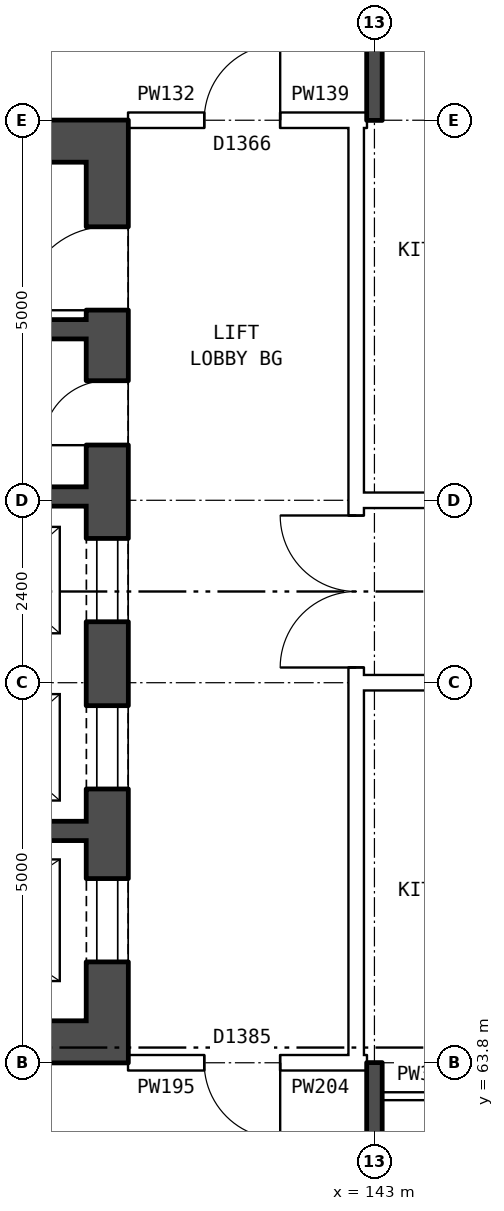
"""IFC4 building model, lengths in metres.
Left out: names, types, materials, properties, quantities, classifications, styles, units other than length and angle.
Written with IfcOpenShell. Run it as: python <this file> out.ifc"""

import sys

from ifc_helpers import new_model, si_unit, direction, frame, frame_2d, origin, place, context, subcontext, project, spatial, rectangle, extrude, element, fill, save


model = new_model("IFC4")
c1 = context("Model", 3, precision=1e-05, world=origin(), true_north=direction((0.0, 1.0)))
c2 = subcontext(c1, "Body", "Model", "MODEL_VIEW")
j1 = project(units=[si_unit("LENGTHUNIT", "METRE"), si_unit("PLANEANGLEUNIT", "RADIAN")], contexts=[c1])
p1 = place(None, origin())
s1 = spatial("IfcSite", under=j1, at=p1, CompositionType="ELEMENT")
p2 = place(p1, origin())
s2 = spatial("IfcBuilding", under=s1, at=p2, CompositionType="ELEMENT")
p3 = place(p2, frame((0.0, 0.0, 129.9)))
s3 = spatial("IfcBuildingStorey", under=s2, at=p3, CompositionType="ELEMENT", Elevation=129.9)
p4 = place(p3, frame((139.485, 63.8, 0.0), z_axis=(0.0, 0.0, 1.0), x_axis=(0.0, 1.0, 0.0)))
e1 = element("IfcWall", 1, at=p4, inside=s3, PredefinedType="SHEAR", context=c2, shape_type="SweptSolid", body=[
    extrude(rectangle(XDim=12.4, YDim=0.55, at=frame_2d((6.2, 0.0))), origin(), (0.0, 0.0, 1.0), 2.85),
])
p5 = place(p4, frame((1.325, 0.0, 0.0)))
e2 = element("IfcOpeningElement", 2, at=p5, cuts=e1, PredefinedType="OPENING", context=c2, shape_type="SweptSolid", body=[
    extrude(rectangle(XDim=1.1, YDim=2.1, at=frame_2d((0.55, 1.05))), frame((0.0, 0.285, 0.0), z_axis=(0.0, -1.0, 0.0), x_axis=(1.0, 0.0, 0.0)), (0.0, 0.0, 1.0), 0.57),
])
p6 = place(p4, frame((3.6, 0.0, 0.0)))
e3 = element("IfcOpeningElement", 3, at=p6, cuts=e1, PredefinedType="OPENING", context=c2, shape_type="SweptSolid", body=[
    extrude(rectangle(XDim=1.1, YDim=2.1, at=frame_2d((0.55, 1.05))), frame((0.0, 0.285, 0.0), z_axis=(0.0, -1.0, 0.0), x_axis=(1.0, 0.0, 0.0)), (0.0, 0.0, 1.0), 0.57),
])
p7 = place(p4, frame((5.8, 0.0, 0.0)))
e4 = element("IfcOpeningElement", 4, at=p7, cuts=e1, PredefinedType="OPENING", context=c2, shape_type="SweptSolid", body=[
    extrude(rectangle(XDim=1.1, YDim=2.1, at=frame_2d((0.55, 1.05))), frame((0.0, 0.285, 0.0), z_axis=(0.0, -1.0, 0.0), x_axis=(1.0, 0.0, 0.0)), (0.0, 0.0, 1.0), 0.57),
])
p8 = place(p4, frame((9.9, 0.0, 0.0)))
e5 = element("IfcOpeningElement", 5, at=p8, cuts=e1, PredefinedType="OPENING", context=c2, shape_type="SweptSolid", body=[
    extrude(rectangle(XDim=1.1, YDim=2.1, at=frame_2d((0.55, 1.05))), frame((0.0, 0.285, 0.0), z_axis=(0.0, -1.0, 0.0), x_axis=(1.0, 0.0, 0.0)), (0.0, 0.0, 1.0), 0.57),
])
p9 = place(p4, frame((8.125, 0.0, 0.0)))
e6 = element("IfcOpeningElement", 6, at=p9, cuts=e1, PredefinedType="OPENING", context=c2, shape_type="SweptSolid", body=[
    extrude(rectangle(XDim=0.85, YDim=2.1, at=frame_2d((0.425, 1.05))), frame((0.0, 0.285, 0.0), z_axis=(0.0, -1.0, 0.0), x_axis=(1.0, 0.0, 0.0)), (0.0, 0.0, 1.0), 0.57),
])
for number, where, z_axis, x_axis in (
    (7, (139.21, 64.075, 0.0), (0.0, 0.0, 1.0), (-1.0, 0.0, 0.0)),
    (8, (139.21, 75.925, 0.0), (0.0, 0.0, 1.0), (-1.0, 0.0, 0.0)),
):
    element("IfcWall", number, at=place(p3, frame(where, z_axis=z_axis, x_axis=x_axis)), inside=s3, PredefinedType="SHEAR", context=c2, shape_type="SweptSolid", body=[
        extrude(rectangle(XDim=7.3, YDim=0.55, at=frame_2d((3.65, 0.0))), origin(), (0.0, 0.0, 1.0), 2.85),
    ])
p10 = place(p3, frame((139.21, 66.85, 0.0), z_axis=(0.0, 0.0, 1.0), x_axis=(-1.0, 0.0, 0.0)))
e9 = element("IfcWall", 9, at=p10, inside=s3, PredefinedType="SHEAR", context=c2, shape_type="SweptSolid", body=[
    extrude(rectangle(XDim=4.475, YDim=0.25, at=frame_2d((2.237, 0.0))), origin(), (0.0, 0.0, 1.0), 2.85),
])
p11 = place(p3, frame((139.21, 71.25, 0.0), z_axis=(0.0, 0.0, 1.0), x_axis=(-1.0, 0.0, 0.0)))
e10 = element("IfcWall", 10, at=p11, inside=s3, PredefinedType="SHEAR", context=c2, shape_type="SweptSolid", body=[
    extrude(rectangle(XDim=7.3, YDim=0.25, at=frame_2d((3.65, 0.0))), origin(), (0.0, 0.0, 1.0), 2.85),
])
p12 = place(p11, frame((4.875, 0.0, 0.0)))
e11 = element("IfcOpeningElement", 11, at=p12, cuts=e10, PredefinedType="OPENING", context=c2, shape_type="SweptSolid", body=[
    extrude(rectangle(XDim=1.1, YDim=2.1, at=frame_2d((0.55, 1.05))), frame((0.0, 0.135, 0.0), z_axis=(0.0, -1.0, 0.0), x_axis=(1.0, 0.0, 0.0)), (0.0, 0.0, 1.0), 0.27),
])
p13 = place(p11, frame((3.125, 0.0, 0.0)))
e12 = element("IfcOpeningElement", 12, at=p13, cuts=e10, PredefinedType="OPENING", context=c2, shape_type="SweptSolid", body=[
    extrude(rectangle(XDim=0.85, YDim=2.1, at=frame_2d((0.425, 1.05))), frame((0.0, 0.135, 0.0), z_axis=(0.0, -1.0, 0.0), x_axis=(1.0, 0.0, 0.0)), (0.0, 0.0, 1.0), 0.27),
])
p14 = place(p3, frame((139.21, 73.45, 0.0), z_axis=(0.0, 0.0, 1.0), x_axis=(-1.0, 0.0, 0.0)))
e13 = element("IfcWall", 13, at=p14, inside=s3, PredefinedType="SHEAR", context=c2, shape_type="SweptSolid", body=[
    extrude(rectangle(XDim=2.375, YDim=0.25, at=frame_2d((1.188, 0.0))), origin(), (0.0, 0.0, 1.0), 2.85),
])
p15 = place(p3, frame((142.76, 63.9, 0.0), z_axis=(0.0, 0.0, 1.0), x_axis=(0.0, 1.0, 0.0)))
e14 = element("IfcWall", 14, at=p15, inside=s3, PredefinedType="PARTITIONING", context=c2, shape_type="SweptSolid", body=[
    extrude(rectangle(XDim=12.2, YDim=0.2, at=frame_2d((6.1, 0.0))), origin(), (0.0, 0.0, 1.0), 2.85),
])
p16 = place(p15, frame((5.1, 0.0, 0.0)))
e15 = element("IfcOpeningElement", 15, at=p16, cuts=e14, PredefinedType="OPENING", context=c2, shape_type="SweptSolid", body=[
    extrude(rectangle(XDim=2.0, YDim=2.1, at=frame_2d((1.0, 1.05))), frame((0.0, 0.11, 0.0), z_axis=(0.0, -1.0, 0.0), x_axis=(1.0, 0.0, 0.0)), (0.0, 0.0, 1.0), 0.22),
])
p17 = place(p3, frame((143.1, 63.36, 0.0), z_axis=(0.0, 0.0, 1.0), x_axis=(1.0, 0.0, 0.0)))
e16 = element("IfcWall", 16, at=p17, inside=s3, PredefinedType="PARTITIONING", context=c2, shape_type="SweptSolid", body=[
    extrude(rectangle(XDim=2.9, YDim=0.1, at=frame_2d((1.45, 0.0))), origin(), (0.0, 0.0, 1.0), 2.85),
])
p18 = place(p17, frame((1.0, 0.0, 0.0)))
e17 = element("IfcOpeningElement", 17, at=p18, cuts=e16, PredefinedType="OPENING", context=c2, shape_type="SweptSolid", body=[
    extrude(rectangle(XDim=0.9, YDim=2.1, at=frame_2d((0.45, 1.05))), frame((0.0, 0.06, 0.0), z_axis=(0.0, -1.0, 0.0), x_axis=(1.0, 0.0, 0.0)), (0.0, 0.0, 1.0), 0.12),
])
p19 = place(p3, frame((139.76, 63.8, 0.0), z_axis=(0.0, 0.0, 1.0), x_axis=(1.0, 0.0, 0.0)))
e18 = element("IfcWall", 18, at=p19, inside=s3, PredefinedType="PARTITIONING", context=c2, shape_type="SweptSolid", body=[
    extrude(rectangle(XDim=3.0, YDim=0.2, at=frame_2d((1.5, 0.0))), origin(), (0.0, 0.0, 1.0), 2.85),
])
p20 = place(p19, frame((1.0, 0.0, 0.0)))
e19 = element("IfcOpeningElement", 19, at=p20, cuts=e18, PredefinedType="OPENING", context=c2, shape_type="SweptSolid", body=[
    extrude(rectangle(XDim=1.0, YDim=2.1, at=frame_2d((0.5, 1.05))), frame((0.0, 0.11, 0.0), z_axis=(0.0, -1.0, 0.0), x_axis=(1.0, 0.0, 0.0)), (0.0, 0.0, 1.0), 0.22),
])
p21 = place(p3, frame((142.76, 63.8, 0.0), z_axis=(0.0, 0.0, 1.0), x_axis=(1.0, 0.0, 0.0)))
e20 = element("IfcWall", 20, at=p21, inside=s3, PredefinedType="PARTITIONING", context=c2, shape_type="SweptSolid", body=[
    extrude(rectangle(XDim=0.14, YDim=0.2, at=frame_2d((0.07, 0.0))), origin(), (0.0, 0.0, 1.0), 2.85),
])
p22 = place(p3, frame((142.76, 68.8, 0.0), z_axis=(0.0, 0.0, 1.0), x_axis=(1.0, 0.0, 0.0)))
e21 = element("IfcWall", 21, at=p22, inside=s3, PredefinedType="PARTITIONING", context=c2, shape_type="SweptSolid", body=[
    extrude(rectangle(XDim=14.48, YDim=0.2, at=frame_2d((7.24, 0.0))), origin(), (0.0, 0.0, 1.0), 2.85),
])
p23 = place(p22, frame((1.12, 0.0, 0.0)))
e22 = element("IfcOpeningElement", 22, at=p23, cuts=e21, PredefinedType="OPENING", context=c2, shape_type="SweptSolid", body=[
    extrude(rectangle(XDim=1.0, YDim=2.1, at=frame_2d((0.5, 1.05))), frame((0.0, 0.11, 0.0), z_axis=(0.0, -1.0, 0.0), x_axis=(1.0, 0.0, 0.0)), (0.0, 0.0, 1.0), 0.22),
])
p24 = place(p22, frame((7.24, 0.0, 0.0)))
e23 = element("IfcOpeningElement", 23, at=p24, cuts=e21, PredefinedType="OPENING", context=c2, shape_type="SweptSolid", body=[
    extrude(rectangle(XDim=1.0, YDim=2.1, at=frame_2d((0.5, 1.05))), frame((0.0, 0.11, 0.0), z_axis=(0.0, -1.0, 0.0), x_axis=(1.0, 0.0, 0.0)), (0.0, 0.0, 1.0), 0.22),
])
p25 = place(p3, frame((142.76, 71.2, 0.0), z_axis=(0.0, 0.0, 1.0), x_axis=(1.0, 0.0, 0.0)))
e24 = element("IfcWall", 24, at=p25, inside=s3, PredefinedType="PARTITIONING", context=c2, shape_type="SweptSolid", body=[
    extrude(rectangle(XDim=14.48, YDim=0.2, at=frame_2d((7.24, 0.0))), origin(), (0.0, 0.0, 1.0), 2.85),
])
p26 = place(p25, frame((1.12, 0.0, 0.0)))
e25 = element("IfcOpeningElement", 25, at=p26, cuts=e24, PredefinedType="OPENING", context=c2, shape_type="SweptSolid", body=[
    extrude(rectangle(XDim=1.0, YDim=2.1, at=frame_2d((0.5, 1.05))), frame((0.0, 0.11, 0.0), z_axis=(0.0, -1.0, 0.0), x_axis=(1.0, 0.0, 0.0)), (0.0, 0.0, 1.0), 0.22),
])
p27 = place(p25, frame((10.24, 0.0, 0.0)))
e26 = element("IfcOpeningElement", 26, at=p27, cuts=e24, PredefinedType="OPENING", context=c2, shape_type="SweptSolid", body=[
    extrude(rectangle(XDim=1.0, YDim=2.1, at=frame_2d((0.5, 1.05))), frame((0.0, 0.11, 0.0), z_axis=(0.0, -1.0, 0.0), x_axis=(1.0, 0.0, 0.0)), (0.0, 0.0, 1.0), 0.22),
])
p28 = place(p3, frame((139.76, 76.2, 0.0), z_axis=(0.0, 0.0, 1.0), x_axis=(1.0, 0.0, 0.0)))
e27 = element("IfcWall", 27, at=p28, inside=s3, PredefinedType="PARTITIONING", context=c2, shape_type="SweptSolid", body=[
    extrude(rectangle(XDim=3.0, YDim=0.2, at=frame_2d((1.5, 0.0))), origin(), (0.0, 0.0, 1.0), 2.85),
])
p29 = place(p28, frame((1.0, 0.0, 0.0)))
e28 = element("IfcOpeningElement", 28, at=p29, cuts=e27, PredefinedType="OPENING", context=c2, shape_type="SweptSolid", body=[
    extrude(rectangle(XDim=1.0, YDim=2.1, at=frame_2d((0.5, 1.05))), frame((0.0, 0.11, 0.0), z_axis=(0.0, -1.0, 0.0), x_axis=(1.0, 0.0, 0.0)), (0.0, 0.0, 1.0), 0.22),
])
p30 = place(p3, frame((142.76, 76.2, 0.0), z_axis=(0.0, 0.0, 1.0), x_axis=(1.0, 0.0, 0.0)))
e29 = element("IfcWall", 29, at=p30, inside=s3, PredefinedType="PARTITIONING", context=c2, shape_type="SweptSolid", body=[
    extrude(rectangle(XDim=0.14, YDim=0.2, at=frame_2d((0.07, 0.0))), origin(), (0.0, 0.0, 1.0), 2.85),
])
for number, where, z_axis, x_axis in (
    (30, (143.0, 54.36, 0.0), (0.0, 0.0, 1.0), (0.0, 1.0, 0.0)),
    (31, (143.0, 76.2, 0.0), (0.0, 0.0, 1.0), (0.0, 1.0, 0.0)),
):
    element("IfcWall", number, at=place(p3, frame(where, z_axis=z_axis, x_axis=x_axis)), inside=s3, PredefinedType="SOLIDWALL", context=c2, shape_type="SweptSolid", body=[
        extrude(rectangle(XDim=9.44, YDim=0.2, at=frame_2d((4.72, 0.0))), origin(), (0.0, 0.0, 1.0), 2.85),
    ])
p31 = place(p5, origin())
e32 = element("IfcDoor", 32, at=p31, inside=s3, OperationType="DOUBLE_DOOR_SLIDING", PredefinedType="DOOR", context=c2, shape_type="SweptSolid", body=[
    extrude(rectangle(XDim=1.1, YDim=2.1, at=frame_2d((0.55, 1.05))), frame((0.0, 0.26, 0.0), z_axis=(0.0, -1.0, 0.0), x_axis=(1.0, 0.0, 0.0)), (0.0, 0.0, 1.0), 0.05),
])
fill(e2, e32)
p32 = place(p6, origin())
e33 = element("IfcDoor", 33, at=p32, inside=s3, OperationType="DOUBLE_DOOR_SLIDING", PredefinedType="DOOR", context=c2, shape_type="SweptSolid", body=[
    extrude(rectangle(XDim=1.1, YDim=2.1, at=frame_2d((0.55, 1.05))), frame((0.0, 0.26, 0.0), z_axis=(0.0, -1.0, 0.0), x_axis=(1.0, 0.0, 0.0)), (0.0, 0.0, 1.0), 0.05),
])
fill(e3, e33)
p33 = place(p7, origin())
e34 = element("IfcDoor", 34, at=p33, inside=s3, OperationType="DOUBLE_DOOR_SLIDING", PredefinedType="DOOR", context=c2, shape_type="SweptSolid", body=[
    extrude(rectangle(XDim=1.1, YDim=2.1, at=frame_2d((0.55, 1.05))), frame((0.0, 0.26, 0.0), z_axis=(0.0, -1.0, 0.0), x_axis=(1.0, 0.0, 0.0)), (0.0, 0.0, 1.0), 0.05),
])
fill(e4, e34)
p34 = place(p8, origin())
e35 = element("IfcDoor", 35, at=p34, inside=s3, OperationType="SINGLE_SWING_LEFT", PredefinedType="DOOR", context=c2, shape_type="SweptSolid", body=[
    extrude(rectangle(XDim=1.1, YDim=2.1, at=frame_2d((0.55, 1.05))), frame((0.0, 0.26, 0.0), z_axis=(0.0, -1.0, 0.0), x_axis=(1.0, 0.0, 0.0)), (0.0, 0.0, 1.0), 0.05),
])
fill(e5, e35)
p35 = place(p9, origin())
e36 = element("IfcDoor", 36, at=p35, inside=s3, OperationType="SINGLE_SWING_LEFT", PredefinedType="DOOR", context=c2, shape_type="SweptSolid", body=[
    extrude(rectangle(XDim=0.85, YDim=2.1, at=frame_2d((0.425, 1.05))), frame((0.0, 0.26, 0.0), z_axis=(0.0, -1.0, 0.0), x_axis=(1.0, 0.0, 0.0)), (0.0, 0.0, 1.0), 0.05),
])
fill(e6, e36)
p36 = place(p16, origin())
e37 = element("IfcDoor", 37, at=p36, inside=s3, OperationType="DOUBLE_DOOR_SINGLE_SWING", PredefinedType="DOOR", context=c2, shape_type="SweptSolid", body=[
    extrude(rectangle(XDim=2.0, YDim=2.1, at=frame_2d((1.0, 1.05))), frame((0.0, 0.025, 0.0), z_axis=(0.0, -1.0, 0.0), x_axis=(1.0, 0.0, 0.0)), (0.0, 0.0, 1.0), 0.05),
])
fill(e15, e37)
p37 = place(p20, frame((1.0, 0.0, 0.0), z_axis=(0.0, 0.0, 1.0), x_axis=(-1.0, 0.0, 0.0)))
e38 = element("IfcDoor", 38, at=p37, inside=s3, OperationType="SINGLE_SWING_LEFT", PredefinedType="DOOR", context=c2, shape_type="SweptSolid", body=[
    extrude(rectangle(XDim=1.0, YDim=2.1, at=frame_2d((0.5, 1.05))), frame((0.0, 0.025, 0.0), z_axis=(0.0, -1.0, 0.0), x_axis=(1.0, 0.0, 0.0)), (0.0, 0.0, 1.0), 0.05),
])
fill(e19, e38)
p38 = place(p29, origin())
e39 = element("IfcDoor", 39, at=p38, inside=s3, OperationType="SINGLE_SWING_RIGHT", PredefinedType="DOOR", context=c2, shape_type="SweptSolid", body=[
    extrude(rectangle(XDim=1.0, YDim=2.1, at=frame_2d((0.5, 1.05))), frame((0.0, 0.025, 0.0), z_axis=(0.0, -1.0, 0.0), x_axis=(1.0, 0.0, 0.0)), (0.0, 0.0, 1.0), 0.05),
])
fill(e28, e39)
save(model, sys.argv[1])
